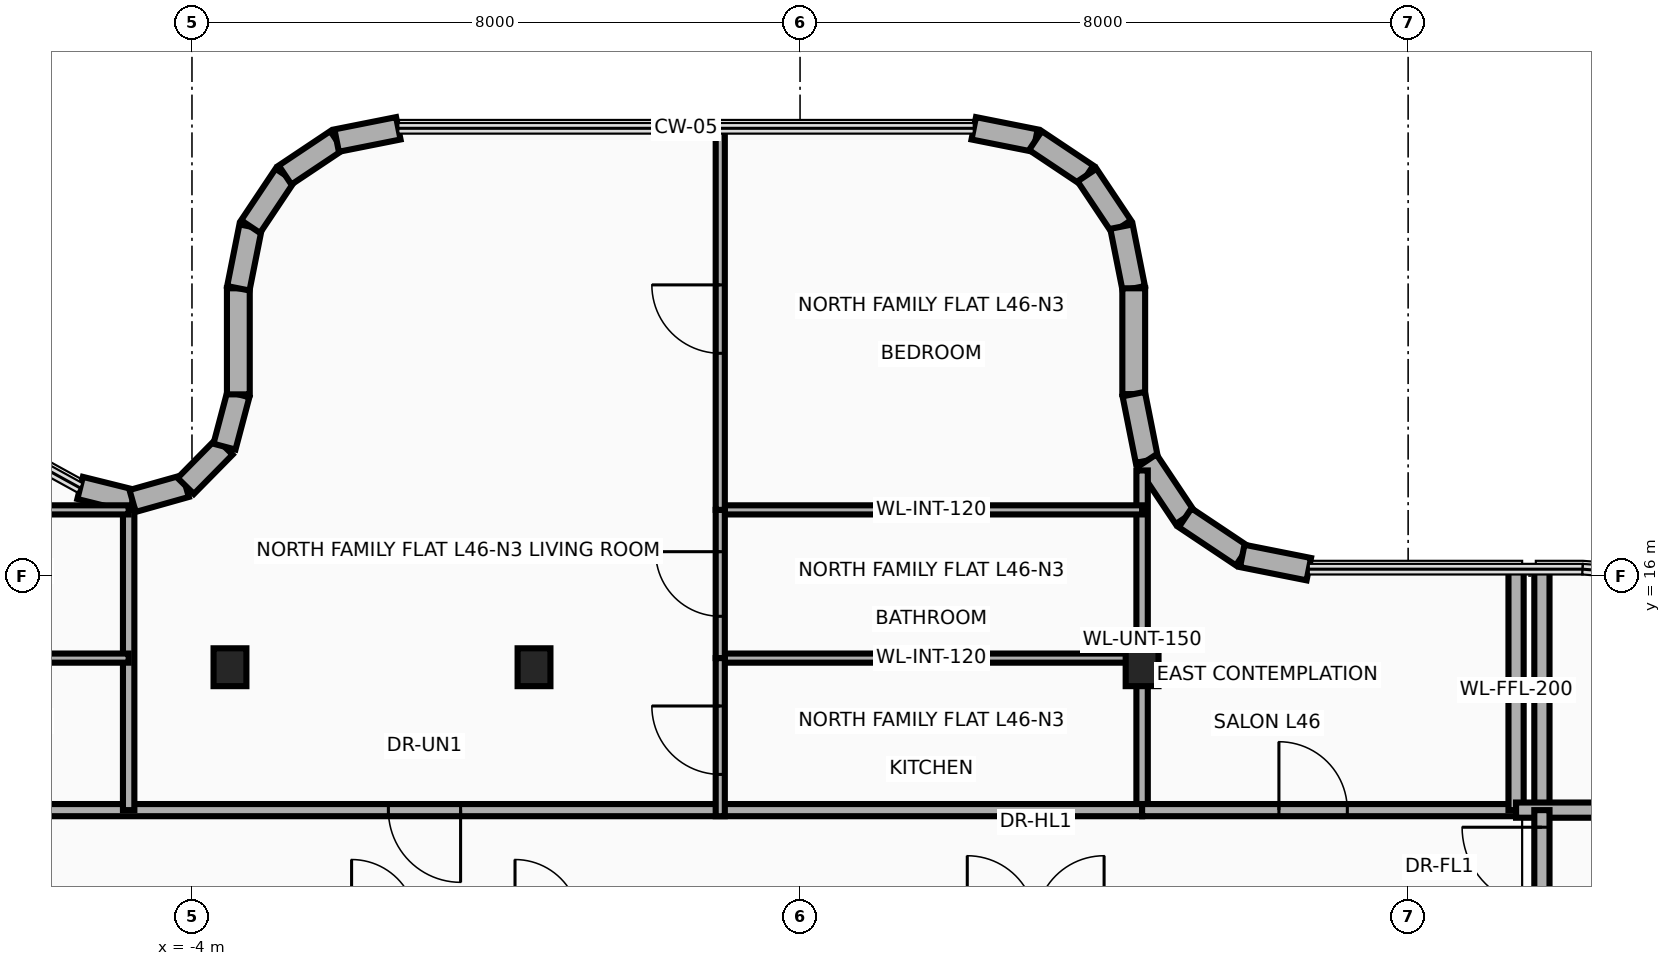
"""IFC4 building model, lengths in metres.
Left out: names, types, materials, properties, quantities, classifications, styles, units other than length and angle.
Written with IfcOpenShell. Run it as: python <this file> out.ifc"""

import sys

from ifc_helpers import new_model, si_unit, direction, frame, frame_2d, origin, origin_2d, place, context, subcontext, project, spatial, rectangle, i_section, extrude, source, transform, mapped, element, fill, save


model = new_model("IFC4")
c1 = context("Model", 3, precision=1e-05, world=origin(), true_north=direction((0.0, 1.0)))
c2 = subcontext(c1, "Body", "Model", "MODEL_VIEW")
j1 = project(units=[si_unit("LENGTHUNIT", "METRE"), si_unit("PLANEANGLEUNIT", "RADIAN")], contexts=[c1])
p1 = place(None, origin())
s1 = spatial("IfcSite", under=j1, at=p1, CompositionType="ELEMENT")
p2 = place(p1, origin())
s2 = spatial("IfcBuilding", under=s1, at=p2, CompositionType="ELEMENT")
p3 = place(p2, frame((0.0, 0.0, 180.5)))
s3 = spatial("IfcBuildingStorey", under=s2, at=p3, CompositionType="ELEMENT", Elevation=180.5)
m1 = source(origin(), c2, "Body", "SweptSolid", [
    extrude(i_section(OverallWidth=0.432, OverallDepth=0.498, WebThickness=0.056, FlangeThickness=0.089, at=origin_2d()), origin(), (0.0, 0.0, 1.0), 3.95),
])
for number, where, z_axis, x_axis in (
    (1, (-3.5, 14.8, 0.0), (0.0, 0.0, 1.0), (1.0, 0.0, 0.0)),
    (2, (8.5, 14.8, 0.0), (0.0, 0.0, 1.0), (1.0, 0.0, 0.0)),
    (3, (0.5, 14.8, 0.0), (0.0, 0.0, 1.0), (1.0, 0.0, 0.0)),
):
    element("IfcColumn", number, at=place(p3, frame(where, z_axis=z_axis, x_axis=x_axis)), inside=s3, PredefinedType="COLUMN", context=c2, shape_type="MappedRepresentation", body=[
        mapped(m1, transform((0.0, 0.0, 0.0), x_axis=(1.0, 0.0, 0.0), y_axis=(0.0, 1.0, 0.0), z_axis=(0.0, 0.0, 1.0), scale=1.0)),
    ])
p4 = place(p3, frame((-5.472, 17.159, 0.0), z_axis=(0.0, 0.0, 1.0), x_axis=(0.970564820059, -0.240840050789, 0.0)))
e4 = element("IfcWall", 4, at=p4, inside=s3, PredefinedType="SOLIDWALL", context=c2, shape_type="SweptSolid", body=[
    extrude(rectangle(XDim=0.712, YDim=0.3, at=frame_2d((0.356, 0.0))), origin(), (0.0, 0.0, 1.0), 3.63),
])
p5 = place(p3, frame((-4.781, 16.987, 0.0), z_axis=(0.0, 0.0, 1.0), x_axis=(0.962494705656, 0.271300463662, 0.0)))
e5 = element("IfcWall", 5, at=p5, inside=s3, PredefinedType="SOLIDWALL", context=c2, shape_type="SweptSolid", body=[
    extrude(rectangle(XDim=0.726, YDim=0.3, at=frame_2d((0.363, 0.0))), origin(), (0.0, 0.0, 1.0), 3.63),
])
p6 = place(p3, frame((-4.082, 17.184, 0.0), z_axis=(0.0, 0.0, 1.0), x_axis=(0.701538604215, 0.712631452293, 0.0)))
e6 = element("IfcWall", 6, at=p6, inside=s3, PredefinedType="SOLIDWALL", context=c2, shape_type="SweptSolid", body=[
    extrude(rectangle(XDim=0.726, YDim=0.3, at=frame_2d((0.363, 0.0))), origin(), (0.0, 0.0, 1.0), 2.615),
])
p7 = place(p3, frame((-3.573, 17.702, 0.0), z_axis=(0.0, 0.0, 1.0), x_axis=(0.256637481794, 0.966507735581, 0.0)))
e7 = element("IfcWall", 7, at=p7, inside=s3, PredefinedType="SOLIDWALL", context=c2, shape_type="SweptSolid", body=[
    extrude(rectangle(XDim=0.712, YDim=0.3, at=frame_2d((0.356, 0.0))), origin(), (0.0, 0.0, 1.0), 2.615),
])
p8 = place(p3, frame((-3.39, 18.39, 0.0), z_axis=(0.0, 0.0, 1.0), x_axis=(0.0, 1.0, 0.0)))
e8 = element("IfcWall", 8, at=p8, inside=s3, PredefinedType="SOLIDWALL", context=c2, shape_type="SweptSolid", body=[
    extrude(rectangle(XDim=1.396, YDim=0.3, at=frame_2d((0.698, 0.0))), origin(), (0.0, 0.0, 1.0), 2.615),
])
p9 = place(p3, frame((-3.39, 19.785, 0.0), z_axis=(0.0, 0.0, 1.0), x_axis=(0.195094354541, 0.980784478276, 0.0)))
e9 = element("IfcWall", 9, at=p9, inside=s3, PredefinedType="SOLIDWALL", context=c2, shape_type="SweptSolid", body=[
    extrude(rectangle(XDim=0.827, YDim=0.3, at=frame_2d((0.414, 0.0))), origin(), (0.0, 0.0, 1.0), 2.615),
])
p10 = place(p3, frame((-3.229, 20.596, 0.0), z_axis=(0.0, 0.0, 1.0), x_axis=(0.55545926088, 0.831543750805, 0.0)))
e10 = element("IfcWall", 10, at=p10, inside=s3, PredefinedType="SOLIDWALL", context=c2, shape_type="SweptSolid", body=[
    extrude(rectangle(XDim=0.816, YDim=0.3, at=frame_2d((0.408, 0.0))), origin(), (0.0, 0.0, 1.0), 2.615),
])
p11 = place(p3, frame((-2.775, 21.275, 0.0), z_axis=(0.0, 0.0, 1.0), x_axis=(0.831543750805, 0.55545926088, 0.0)))
e11 = element("IfcWall", 11, at=p11, inside=s3, PredefinedType="SOLIDWALL", context=c2, shape_type="SweptSolid", body=[
    extrude(rectangle(XDim=0.816, YDim=0.3, at=frame_2d((0.408, 0.0))), origin(), (0.0, 0.0, 1.0), 3.63),
])
for number, where, z_axis, x_axis in (
    (12, (-2.096, 21.729, 0.0), (0.0, 0.0, 1.0), (0.981, 0.195, 0.0)),
    (13, (6.285, 21.89, 0.0), (0.0, 0.0, 1.0), (0.981, -0.195, 0.0)),
):
    element("IfcWall", number, at=place(p3, frame(where, z_axis=z_axis, x_axis=x_axis)), inside=s3, PredefinedType="SOLIDWALL", context=c2, shape_type="SweptSolid", body=[
        extrude(rectangle(XDim=0.827, YDim=0.3, at=frame_2d((0.414, 0.0))), origin(), (0.0, 0.0, 1.0), 3.076),
    ])
p12 = place(p3, frame((7.096, 21.729, 0.0), z_axis=(0.0, 0.0, 1.0), x_axis=(0.831543750805, -0.55545926088, 0.0)))
e14 = element("IfcWall", 14, at=p12, inside=s3, PredefinedType="SOLIDWALL", context=c2, shape_type="SweptSolid", body=[
    extrude(rectangle(XDim=0.816, YDim=0.3, at=frame_2d((0.408, 0.0))), origin(), (0.0, 0.0, 1.0), 3.63),
])
p13 = place(p3, frame((7.775, 21.275, 0.0), z_axis=(0.0, 0.0, 1.0), x_axis=(0.55545926088, -0.831543750805, 0.0)))
e15 = element("IfcWall", 15, at=p13, inside=s3, PredefinedType="SOLIDWALL", context=c2, shape_type="SweptSolid", body=[
    extrude(rectangle(XDim=0.816, YDim=0.3, at=frame_2d((0.408, 0.0))), origin(), (0.0, 0.0, 1.0), 2.615),
])
p14 = place(p3, frame((8.229, 20.596, 0.0), z_axis=(0.0, 0.0, 1.0), x_axis=(0.195094354541, -0.980784478276, 0.0)))
e16 = element("IfcWall", 16, at=p14, inside=s3, PredefinedType="SOLIDWALL", context=c2, shape_type="SweptSolid", body=[
    extrude(rectangle(XDim=0.827, YDim=0.3, at=frame_2d((0.414, 0.0))), origin(), (0.0, 0.0, 1.0), 2.615),
])
p15 = place(p3, frame((8.39, 19.785, 0.0), z_axis=(0.0, 0.0, 1.0), x_axis=(0.0, -1.0, 0.0)))
e17 = element("IfcWall", 17, at=p15, inside=s3, PredefinedType="SOLIDWALL", context=c2, shape_type="SweptSolid", body=[
    extrude(rectangle(XDim=1.392, YDim=0.3, at=frame_2d((0.696, 0.0))), origin(), (0.0, 0.0, 1.0), 2.615),
])
p16 = place(p3, frame((8.39, 18.393, 0.0), z_axis=(0.0, 0.0, 1.0), x_axis=(0.195222179208, -0.980759043163, 0.0)))
e18 = element("IfcWall", 18, at=p16, inside=s3, PredefinedType="SOLIDWALL", context=c2, shape_type="SweptSolid", body=[
    extrude(rectangle(XDim=0.893, YDim=0.3, at=frame_2d((0.446, 0.0))), origin(), (0.0, 0.0, 1.0), 2.615),
])
for number, where, z_axis, x_axis in (
    (19, (8.564, 17.518, 0.0), (0.0, 0.0, 1.0), (0.555, -0.832, 0.0)),
    (20, (9.066, 16.766, 0.0), (0.0, 0.0, 1.0), (0.832, -0.555, 0.0)),
):
    element("IfcWall", number, at=place(p3, frame(where, z_axis=z_axis, x_axis=x_axis)), inside=s3, PredefinedType="SOLIDWALL", context=c2, shape_type="SweptSolid", body=[
        extrude(rectangle(XDim=0.904, YDim=0.3, at=frame_2d((0.452, 0.0))), origin(), (0.0, 0.0, 1.0), 2.615),
    ])
p17 = place(p3, frame((9.818, 16.264, 0.0), z_axis=(0.0, 0.0, 1.0), x_axis=(0.980800964186, -0.195011457743, 0.0)))
e21 = element("IfcWall", 21, at=p17, inside=s3, PredefinedType="SOLIDWALL", context=c2, shape_type="SweptSolid", body=[
    extrude(rectangle(XDim=0.893, YDim=0.3, at=frame_2d((0.446, 0.0))), origin(), (0.0, 0.0, 1.0), 3.63),
])
p18 = place(p3, frame((8.5, 12.92, 0.0), z_axis=(0.0, 0.0, 1.0), x_axis=(0.0, 1.0, 0.0)))
e22 = element("IfcWall", 22, at=p18, inside=s3, PredefinedType="PARTITIONING", context=c2, shape_type="SweptSolid", body=[
    extrude(rectangle(XDim=4.469, YDim=0.15, at=frame_2d((2.234, 0.0))), origin(), (0.0, 0.0, 1.0), 2.615),
])
p19 = place(p3, frame((-28.25, 12.92, 0.0), z_axis=(0.0, 0.0, 1.0), x_axis=(1.0, 0.0, 0.0)))
e23 = element("IfcWall", 23, at=p19, inside=s3, PredefinedType="PARTITIONING", context=c2, shape_type="SweptSolid", body=[
    extrude(rectangle(XDim=36.75, YDim=0.16, at=frame_2d((18.375, 0.0))), origin(), (0.0, 0.0, 1.0), 2.615),
])
p20 = place(p19, frame((1.386, 0.0, 0.0)))
e24 = element("IfcOpeningElement", 24, at=p20, cuts=e23, PredefinedType="OPENING", context=c2, shape_type="SweptSolid", body=[
    extrude(rectangle(XDim=0.95, YDim=2.15, at=frame_2d((0.475, 1.075))), frame((0.0, 0.095, 0.0), z_axis=(0.0, -1.0, 0.0), x_axis=(1.0, 0.0, 0.0)), (0.0, 0.0, 1.0), 0.19),
])
p21 = place(p19, frame((5.327, 0.0, 0.0)))
e25 = element("IfcOpeningElement", 25, at=p21, cuts=e23, PredefinedType="OPENING", context=c2, shape_type="SweptSolid", body=[
    extrude(rectangle(XDim=0.95, YDim=2.15, at=frame_2d((0.475, 1.075))), frame((0.0, 0.095, 0.0), z_axis=(0.0, -1.0, 0.0), x_axis=(1.0, 0.0, 0.0)), (0.0, 0.0, 1.0), 0.19),
])
p22 = place(p19, frame((13.5, 0.0, 0.0)))
e26 = element("IfcOpeningElement", 26, at=p22, cuts=e23, PredefinedType="OPENING", context=c2, shape_type="SweptSolid", body=[
    extrude(rectangle(XDim=0.95, YDim=2.15, at=frame_2d((0.475, 1.075))), frame((0.0, 0.095, 0.0), z_axis=(0.0, -1.0, 0.0), x_axis=(1.0, 0.0, 0.0)), (0.0, 0.0, 1.0), 0.19),
])
p23 = place(p19, frame((26.834, 0.0, 0.0)))
e27 = element("IfcOpeningElement", 27, at=p23, cuts=e23, PredefinedType="OPENING", context=c2, shape_type="SweptSolid", body=[
    extrude(rectangle(XDim=0.95, YDim=2.15, at=frame_2d((0.475, 1.075))), frame((0.0, 0.095, 0.0), z_axis=(0.0, -1.0, 0.0), x_axis=(1.0, 0.0, 0.0)), (0.0, 0.0, 1.0), 0.19),
])
p24 = place(p3, frame((-4.833, 12.92, 0.0), z_axis=(0.0, 0.0, 1.0), x_axis=(0.0, 1.0, 0.0)))
e28 = element("IfcWall", 28, at=p24, inside=s3, PredefinedType="PARTITIONING", context=c2, shape_type="SweptSolid", body=[
    extrude(rectangle(XDim=3.951, YDim=0.15, at=frame_2d((1.976, 0.0))), origin(), (0.0, 0.0, 1.0), 2.415),
])
p25 = place(p3, frame((-10.383, 14.92, 0.0), z_axis=(0.0, 0.0, 1.0), x_axis=(1.0, 0.0, 0.0)))
e29 = element("IfcWall", 29, at=p25, inside=s3, PredefinedType="PARTITIONING", context=c2, shape_type="SweptSolid", body=[
    extrude(rectangle(XDim=5.55, YDim=0.12, at=frame_2d((2.775, 0.0))), origin(), (0.0, 0.0, 1.0), 2.415),
])
p26 = place(p3, frame((-10.383, 16.87, 0.0), z_axis=(0.0, 0.0, 1.0), x_axis=(1.0, 0.0, 0.0)))
e30 = element("IfcWall", 30, at=p26, inside=s3, PredefinedType="PARTITIONING", context=c2, shape_type="SweptSolid", body=[
    extrude(rectangle(XDim=5.55, YDim=0.12, at=frame_2d((2.775, 0.0))), origin(), (0.0, 0.0, 1.0), 3.63),
])
for number, where, z_axis, x_axis in (
    (31, (2.95, 14.92, 0.0), (0.0, 0.0, 1.0), (1.0, 0.0, 0.0)),
    (32, (2.95, 16.87, 0.0), (0.0, 0.0, 1.0), (1.0, 0.0, 0.0)),
):
    element("IfcWall", number, at=place(p3, frame(where, z_axis=z_axis, x_axis=x_axis)), inside=s3, PredefinedType="PARTITIONING", context=c2, shape_type="SweptSolid", body=[
        extrude(rectangle(XDim=5.55, YDim=0.12, at=frame_2d((2.775, 0.0))), origin(), (0.0, 0.0, 1.0), 2.615),
    ])
p27 = place(p3, frame((2.95, 14.92, 0.0), z_axis=(0.0, 0.0, 1.0), x_axis=(0.0, 1.0, 0.0)))
e33 = element("IfcWall", 33, at=p27, inside=s3, PredefinedType="PARTITIONING", context=c2, shape_type="SweptSolid", body=[
    extrude(rectangle(XDim=1.95, YDim=0.12, at=frame_2d((0.975, 0.0))), origin(), (0.0, 0.0, 1.0), 2.665),
])
p28 = place(p27, frame((0.55, 0.0, 0.0)))
e34 = element("IfcOpeningElement", 34, at=p28, cuts=e33, PredefinedType="OPENING", context=c2, shape_type="SweptSolid", body=[
    extrude(rectangle(XDim=0.85, YDim=2.1, at=frame_2d((0.425, 1.05))), frame((0.0, 0.075, 0.0), z_axis=(0.0, -1.0, 0.0), x_axis=(1.0, 0.0, 0.0)), (0.0, 0.0, 1.0), 0.15),
])
p29 = place(p3, frame((2.95, 12.84, 0.0), z_axis=(0.0, 0.0, 1.0), x_axis=(0.0, 1.0, 0.0)))
e35 = element("IfcWall", 35, at=p29, inside=s3, PredefinedType="PARTITIONING", context=c2, shape_type="SweptSolid", body=[
    extrude(rectangle(XDim=2.08, YDim=0.12, at=frame_2d((1.04, 0.0))), origin(), (0.0, 0.0, 1.0), 2.665),
])
p30 = place(p29, frame((0.55, 0.0, 0.0)))
e36 = element("IfcOpeningElement", 36, at=p30, cuts=e35, PredefinedType="OPENING", context=c2, shape_type="SweptSolid", body=[
    extrude(rectangle(XDim=0.9, YDim=2.1, at=frame_2d((0.45, 1.05))), frame((0.0, 0.075, 0.0), z_axis=(0.0, -1.0, 0.0), x_axis=(1.0, 0.0, 0.0)), (0.0, 0.0, 1.0), 0.15),
])
p31 = place(p3, frame((2.95, 16.87, 0.0), z_axis=(0.0, 0.0, 1.0), x_axis=(0.0, 1.0, 0.0)))
e37 = element("IfcWall", 37, at=p31, inside=s3, PredefinedType="PARTITIONING", context=c2, shape_type="SweptSolid", body=[
    extrude(rectangle(XDim=5.02, YDim=0.12, at=frame_2d((2.51, 0.0))), origin(), (0.0, 0.0, 1.0), 3.076),
])
p32 = place(p31, frame((2.06, 0.0, 0.0)))
e38 = element("IfcOpeningElement", 38, at=p32, cuts=e37, PredefinedType="OPENING", context=c2, shape_type="SweptSolid", body=[
    extrude(rectangle(XDim=0.9, YDim=2.1, at=frame_2d((0.45, 1.05))), frame((0.0, 0.075, 0.0), z_axis=(0.0, -1.0, 0.0), x_axis=(1.0, 0.0, 0.0)), (0.0, 0.0, 1.0), 0.15),
])
p33 = place(p3, frame((8.5, 12.92, 0.0), z_axis=(0.0, 0.0, 1.0), x_axis=(1.0, 0.0, 0.0)))
e39 = element("IfcWall", 39, at=p33, inside=s3, PredefinedType="PARTITIONING", context=c2, shape_type="SweptSolid", body=[
    extrude(rectangle(XDim=4.92, YDim=0.16, at=frame_2d((2.46, 0.0))), origin(), (0.0, 0.0, 1.0), 2.615),
])
p34 = place(p33, frame((1.8, 0.0, 0.0)))
e40 = element("IfcOpeningElement", 40, at=p34, cuts=e39, PredefinedType="OPENING", context=c2, shape_type="SweptSolid", body=[
    extrude(rectangle(XDim=0.9, YDim=2.1, at=frame_2d((0.45, 1.05))), frame((0.0, 0.095, 0.0), z_axis=(0.0, -1.0, 0.0), x_axis=(1.0, 0.0, 0.0)), (0.0, 0.0, 1.0), 0.19),
])
for number, where, z_axis, x_axis in (
    (41, (13.42, 12.92, 0.0), (0.0, 0.0, 1.0), (0.0, 1.0, 0.0)),
    (42, (13.76, 12.92, 0.0), (0.0, 0.0, 1.0), (0.0, 1.0, 0.0)),
):
    element("IfcWall", number, at=place(p3, frame(where, z_axis=z_axis, x_axis=x_axis)), inside=s3, PredefinedType="PARTITIONING", context=c2, shape_type="SweptSolid", body=[
        extrude(rectangle(XDim=3.17, YDim=0.2, at=frame_2d((1.585, 0.0))), origin(), (0.0, 0.0, 1.0), 2.665),
    ])
p35 = place(p3, frame((13.42, 12.92, 0.0), z_axis=(0.0, 0.0, 1.0), x_axis=(1.0, 0.0, 0.0)))
e43 = element("IfcWall", 43, at=p35, inside=s3, PredefinedType="PARTITIONING", context=c2, shape_type="SweptSolid", body=[
    extrude(rectangle(XDim=1.98, YDim=0.2, at=frame_2d((0.99, 0.0))), origin(), (0.0, 0.0, 1.0), 3.004),
])
p36 = place(p3, frame((13.76, 11.42, 0.0), z_axis=(0.0, 0.0, 1.0), x_axis=(0.0, 1.0, 0.0)))
e44 = element("IfcWall", 44, at=p36, inside=s3, PredefinedType="PARTITIONING", context=c2, shape_type="SweptSolid", body=[
    extrude(rectangle(XDim=1.5, YDim=0.2, at=frame_2d((0.75, 0.0))), origin(), (0.0, 0.0, 1.0), 3.004),
])
p37 = place(p36, frame((0.225, 0.0, 0.0)))
e45 = element("IfcOpeningElement", 45, at=p37, cuts=e44, PredefinedType="OPENING", context=c2, shape_type="SweptSolid", body=[
    extrude(rectangle(XDim=1.05, YDim=2.15, at=frame_2d((0.525, 1.075))), frame((0.0, 0.115, 0.0), z_axis=(0.0, -1.0, 0.0), x_axis=(1.0, 0.0, 0.0)), (0.0, 0.0, 1.0), 0.23),
])
p38 = place(p23, frame((0.95, 0.0, 0.0), z_axis=(0.0, 0.0, 1.0), x_axis=(-1.0, 0.0, 0.0)))
e46 = element("IfcDoor", 46, at=p38, inside=s3, OperationType="SINGLE_SWING_LEFT", PredefinedType="DOOR", context=c2, shape_type="SweptSolid", body=[
    extrude(rectangle(XDim=0.95, YDim=2.15, at=frame_2d((0.475, 1.075))), frame((0.0, 0.025, 0.0), z_axis=(0.0, -1.0, 0.0), x_axis=(1.0, 0.0, 0.0)), (0.0, 0.0, 1.0), 0.05),
])
fill(e27, e46)
p39 = place(p28, origin())
e47 = element("IfcDoor", 47, at=p39, inside=s3, OperationType="SINGLE_SWING_RIGHT", PredefinedType="DOOR", context=c2, shape_type="SweptSolid", body=[
    extrude(rectangle(XDim=0.85, YDim=2.1, at=frame_2d((0.425, 1.05))), frame((0.0, 0.025, 0.0), z_axis=(0.0, -1.0, 0.0), x_axis=(1.0, 0.0, 0.0)), (0.0, 0.0, 1.0), 0.05),
])
fill(e34, e47)
p40 = place(p30, origin())
e48 = element("IfcDoor", 48, at=p40, inside=s3, OperationType="SINGLE_SWING_LEFT", PredefinedType="DOOR", context=c2, shape_type="SweptSolid", body=[
    extrude(rectangle(XDim=0.9, YDim=2.1, at=frame_2d((0.45, 1.05))), frame((0.0, 0.025, 0.0), z_axis=(0.0, -1.0, 0.0), x_axis=(1.0, 0.0, 0.0)), (0.0, 0.0, 1.0), 0.05),
])
fill(e36, e48)
p41 = place(p32, origin())
e49 = element("IfcDoor", 49, at=p41, inside=s3, OperationType="SINGLE_SWING_RIGHT", PredefinedType="DOOR", context=c2, shape_type="SweptSolid", body=[
    extrude(rectangle(XDim=0.9, YDim=2.1, at=frame_2d((0.45, 1.05))), frame((0.0, 0.025, 0.0), z_axis=(0.0, -1.0, 0.0), x_axis=(1.0, 0.0, 0.0)), (0.0, 0.0, 1.0), 0.05),
])
fill(e38, e49)
p42 = place(p34, origin())
e50 = element("IfcDoor", 50, at=p42, inside=s3, OperationType="SINGLE_SWING_RIGHT", PredefinedType="DOOR", context=c2, shape_type="SweptSolid", body=[
    extrude(rectangle(XDim=0.9, YDim=2.1, at=frame_2d((0.45, 1.05))), frame((0.0, 0.025, 0.0), z_axis=(0.0, -1.0, 0.0), x_axis=(1.0, 0.0, 0.0)), (0.0, 0.0, 1.0), 0.05),
])
fill(e40, e50)
p43 = place(p37, origin())
e51 = element("IfcDoor", 51, at=p43, inside=s3, OperationType="SINGLE_SWING_RIGHT", PredefinedType="DOOR", context=c2, shape_type="SweptSolid", body=[
    extrude(rectangle(XDim=1.05, YDim=2.15, at=frame_2d((0.525, 1.075))), frame((0.0, 0.025, 0.0), z_axis=(0.0, -1.0, 0.0), x_axis=(1.0, 0.0, 0.0)), (0.0, 0.0, 1.0), 0.05),
])
fill(e45, e51)
save(model, sys.argv[1])
